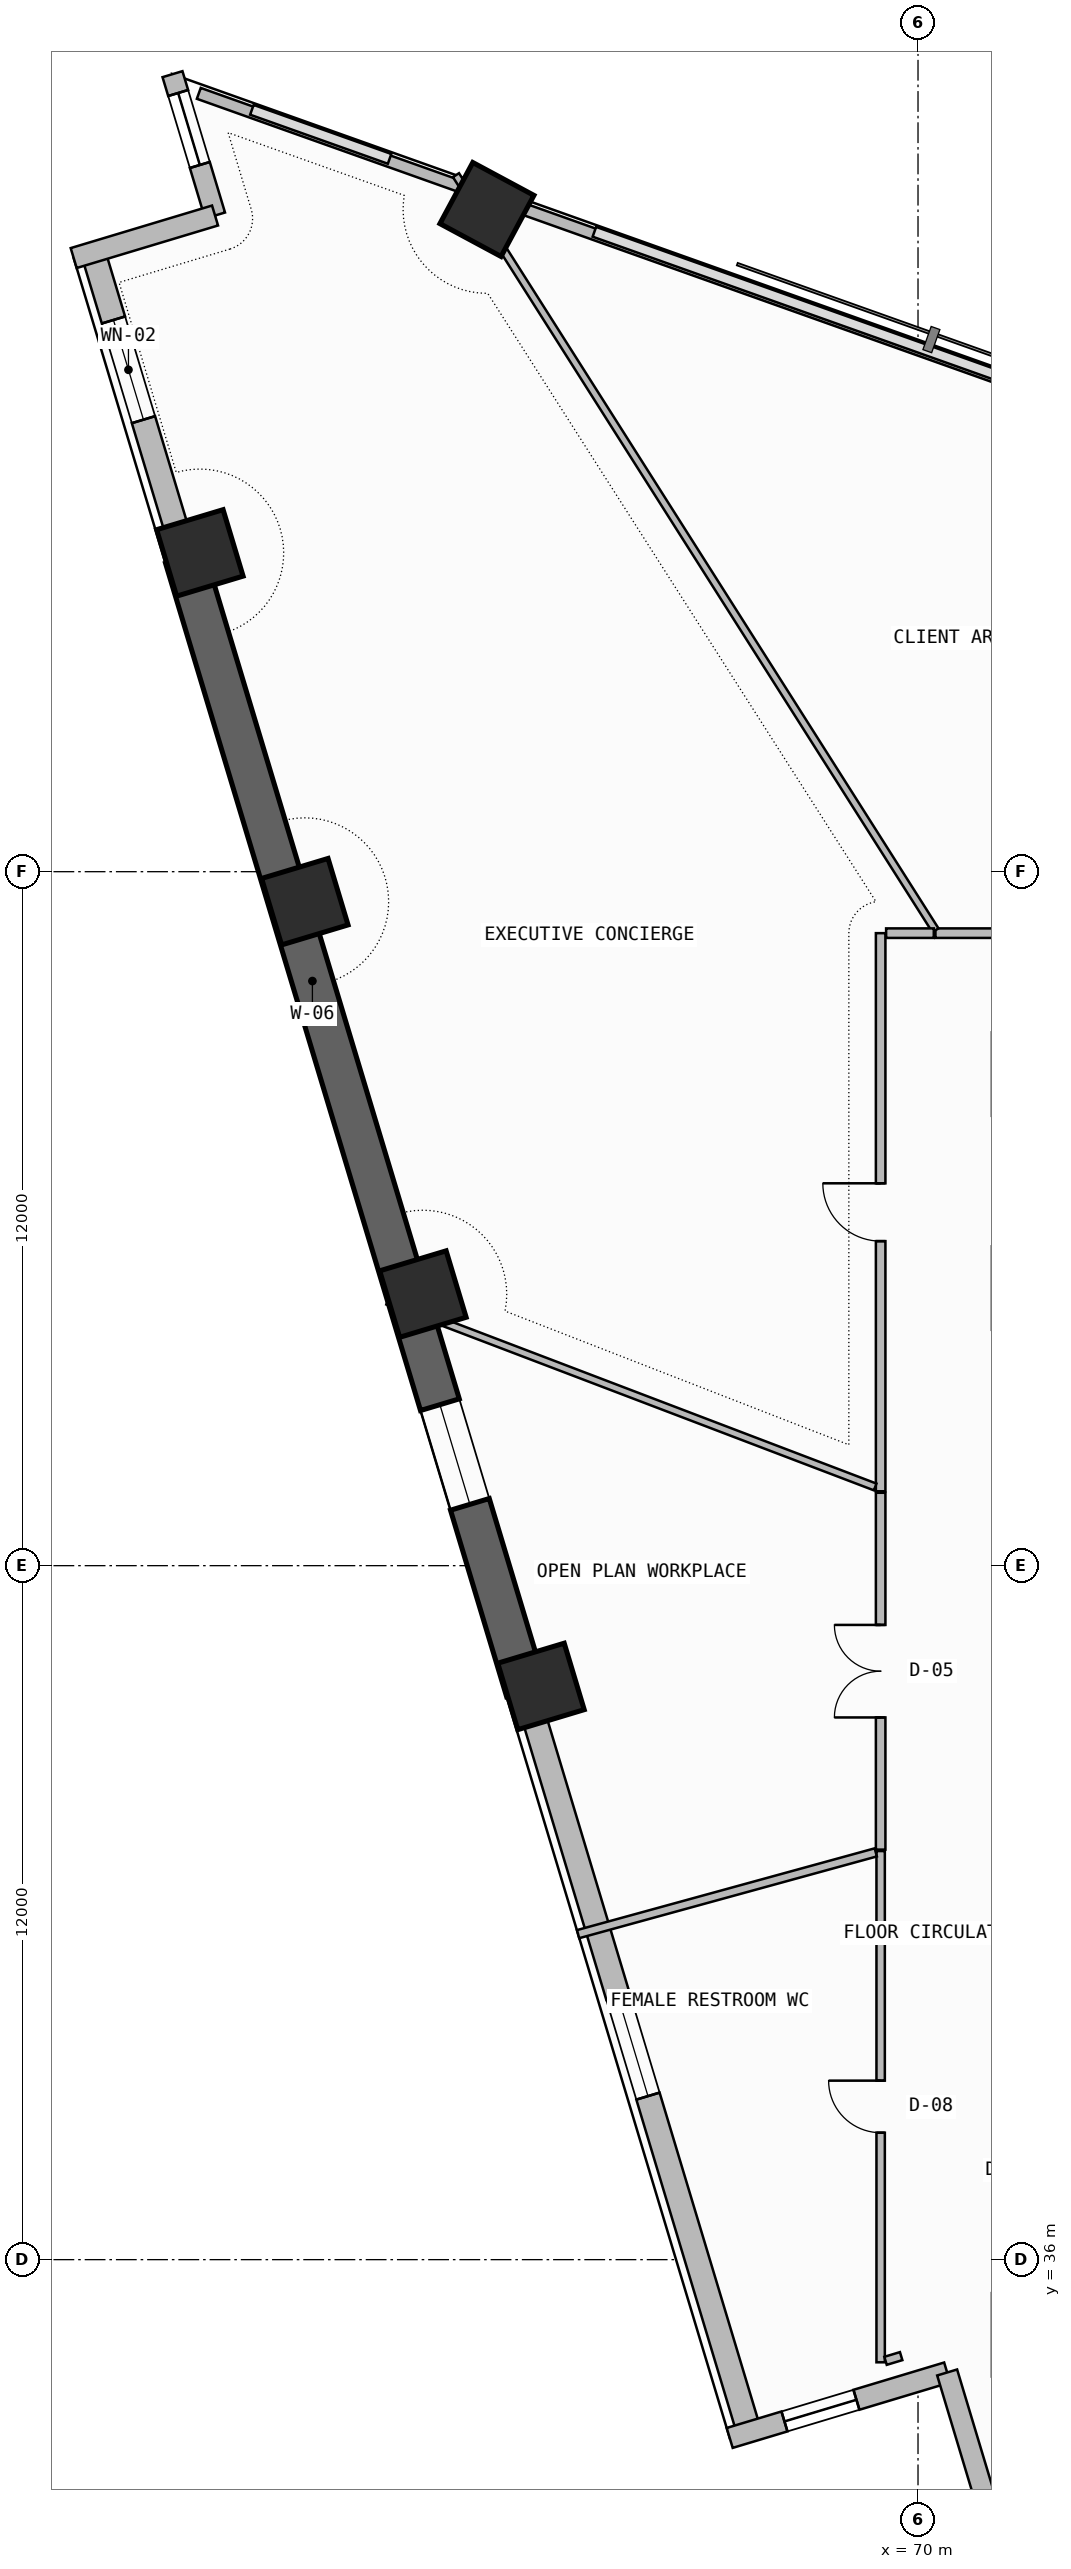
"""IFC4 building model, lengths in metres.
Left out: names, types, materials, properties, quantities, classifications, styles, units other than length and angle.
Written with IfcOpenShell. Run it as: python <this file> out.ifc"""

import sys

from ifc_helpers import new_model, si_unit, direction, frame, frame_2d, origin, origin_2d, place, context, subcontext, project, spatial, rectangle, extrude, element, fill, save


model = new_model("IFC4")
c1 = context("Model", 3, precision=1e-05, world=origin(), true_north=direction((0.0, 1.0)))
c2 = subcontext(c1, "Body", "Model", "MODEL_VIEW")
j1 = project(units=[si_unit("LENGTHUNIT", "METRE"), si_unit("PLANEANGLEUNIT", "RADIAN")], contexts=[c1])
p1 = place(None, origin())
s1 = spatial("IfcSite", under=j1, at=p1, CompositionType="ELEMENT")
p2 = place(p1, origin())
s2 = spatial("IfcBuilding", under=s1, at=p2, CompositionType="ELEMENT")
p3 = place(p2, frame((0.0, 0.0, 153.9)))
s3 = spatial("IfcBuildingStorey", under=s2, at=p3, CompositionType="ELEMENT", Elevation=153.9)
for number, where, z_axis, x_axis in (
    (1, (62.545, 71.45, 0.0), (0.0, 0.0, 1.0), (0.473, 0.881, 0.0)),
    (2, (57.581, 65.512, 0.0), (0.0, 0.0, 1.0), (-0.288, 0.958, 0.0)),
    (3, (59.396, 59.481, 0.0), (0.0, 0.0, 1.0), (-0.288, 0.958, 0.0)),
    (4, (61.438, 52.696, 0.0), (0.0, 0.0, 1.0), (-0.288, 0.958, 0.0)),
    (5, (63.48, 45.912, 0.0), (0.0, 0.0, 1.0), (-0.288, 0.958, 0.0)),
):
    element("IfcColumn", number, at=place(p3, frame(where, z_axis=z_axis, x_axis=x_axis)), inside=s3, PredefinedType="COLUMN", context=c2, shape_type="SweptSolid", body=[
        extrude(rectangle(XDim=1.2, YDim=1.2, at=origin_2d()), origin(), (0.0, 0.0, 1.0), 3.6),
    ])
p4 = place(p3, frame((55.734, 70.711, 0.0), z_axis=(0.0, 0.0, 1.0), x_axis=(0.288221590884, -0.957563739157, 0.0)))
e6 = element("IfcWall", 6, at=p4, inside=s3, PredefinedType="SOLIDWALL", context=c2, shape_type="SweptSolid", body=[
    extrude(rectangle(XDim=5.511, YDim=0.42, at=frame_2d((2.755, 0.0))), origin(), (0.0, 0.0, 1.0), 2.725),
])
p5 = place(p4, frame((1.223, 0.0, 1.2)))
e7 = element("IfcOpeningElement", 7, at=p5, cuts=e6, PredefinedType="OPENING", context=c2, shape_type="SweptSolid", body=[
    extrude(rectangle(XDim=1.8, YDim=0.9, at=frame_2d((0.9, 0.45))), frame((0.0, 0.22, 0.0), z_axis=(0.0, -1.0, 0.0), x_axis=(1.0, 0.0, 0.0)), (0.0, 0.0, 1.0), 0.44),
])
p6 = place(p3, frame((57.323, 65.434, -0.26), z_axis=(0.0, 0.0, 1.0), x_axis=(0.288188159352, -0.957573801234, 0.0)))
e8 = element("IfcWall", 8, at=p6, inside=s3, PredefinedType="SHEAR", context=c2, shape_type="SweptSolid", body=[
    extrude(rectangle(XDim=20.469, YDim=0.7, at=frame_2d((10.234, 0.0))), origin(), (0.0, 0.0, 1.0), 3.6),
])
p7 = place(p6, frame((15.3, 0.0, 1.2)))
e9 = element("IfcOpeningElement", 9, at=p7, cuts=e8, PredefinedType="OPENING", context=c2, shape_type="SweptSolid", body=[
    extrude(rectangle(XDim=1.8, YDim=0.9, at=frame_2d((0.9, 0.45))), frame((0.0, 0.36, 0.0), z_axis=(0.0, -1.0, 0.0), x_axis=(1.0, 0.0, 0.0)), (0.0, 0.0, 1.0), 0.72),
])
p8 = place(p3, frame((63.221, 45.834, 0.0), z_axis=(0.0, 0.0, 1.0), x_axis=(0.288202962273, -0.957569346072, 0.0)))
e10 = element("IfcWall", 10, at=p8, inside=s3, PredefinedType="SOLIDWALL", context=c2, shape_type="SweptSolid", body=[
    extrude(rectangle(XDim=13.384, YDim=0.42, at=frame_2d((6.692, 0.0))), origin(), (0.0, 0.0, 1.0), 2.725),
])
p9 = place(p8, frame((5.517, 0.0, 1.2)))
e11 = element("IfcOpeningElement", 11, at=p9, cuts=e10, PredefinedType="OPENING", context=c2, shape_type="SweptSolid", body=[
    extrude(rectangle(XDim=1.8, YDim=0.9, at=frame_2d((0.9, 0.45))), frame((0.0, 0.22, 0.0), z_axis=(0.0, -1.0, 0.0), x_axis=(1.0, 0.0, 0.0)), (0.0, 0.0, 1.0), 0.44),
])
p10 = place(p3, frame((57.108, 73.79, 0.0), z_axis=(0.0, 0.0, 1.0), x_axis=(0.288198985694, -0.957570542908, 0.0)))
e12 = element("IfcWall", 12, at=p10, inside=s3, PredefinedType="SOLIDWALL", context=c2, shape_type="SweptSolid", body=[
    extrude(rectangle(XDim=2.552, YDim=0.36, at=frame_2d((1.276, 0.0))), origin(), (0.0, 0.0, 1.0), 3.34),
])
p11 = place(p10, frame((0.34, 0.0, 0.45)))
e13 = element("IfcOpeningElement", 13, at=p11, cuts=e12, PredefinedType="OPENING", context=c2, shape_type="SweptSolid", body=[
    extrude(rectangle(XDim=1.3, YDim=2.4, at=frame_2d((0.65, 1.2))), frame((0.0, 0.19, 0.0), z_axis=(0.0, -1.0, 0.0), x_axis=(1.0, 0.0, 0.0)), (0.0, 0.0, 1.0), 0.38),
])
p12 = place(p3, frame((57.843, 71.346, 0.0), z_axis=(0.0, 0.0, 1.0), x_axis=(-0.95757848653, -0.288172590882, 0.0)))
e14 = element("IfcWall", 14, at=p12, inside=s3, PredefinedType="SOLIDWALL", context=c2, shape_type="SweptSolid", body=[
    extrude(rectangle(XDim=2.553, YDim=0.36, at=frame_2d((1.276, 0.0))), origin(), (0.0, 0.0, 1.0), 3.34),
])
p13 = place(p3, frame((66.743, 32.917, 0.0), z_axis=(0.0, 0.0, 1.0), x_axis=(0.957584687378, 0.288151985068, 0.0)))
e15 = element("IfcWall", 15, at=p13, inside=s3, PredefinedType="SOLIDWALL", context=c2, shape_type="SweptSolid", body=[
    extrude(rectangle(XDim=3.927, YDim=0.36, at=frame_2d((1.963, 0.0))), origin(), (0.0, 0.0, 1.0), 3.34),
])
p14 = place(p13, frame((0.989, 0.0, 0.45)))
e16 = element("IfcOpeningElement", 16, at=p14, cuts=e15, PredefinedType="OPENING", context=c2, shape_type="SweptSolid", body=[
    extrude(rectangle(XDim=1.3, YDim=2.4, at=frame_2d((0.65, 1.2))), frame((0.0, 0.19, 0.0), z_axis=(0.0, -1.0, 0.0), x_axis=(1.0, 0.0, 0.0)), (0.0, 0.0, 1.0), 0.38),
])
p15 = place(p3, frame((70.504, 34.049, 0.0), z_axis=(0.0, 0.0, 1.0), x_axis=(0.288169140251, -0.957579524952, 0.0)))
e17 = element("IfcWall", 17, at=p15, inside=s3, PredefinedType="SOLIDWALL", context=c2, shape_type="SweptSolid", body=[
    extrude(rectangle(XDim=3.927, YDim=0.36, at=frame_2d((1.963, 0.0))), origin(), (0.0, 0.0, 1.0), 3.34),
])
p16 = place(p3, frame((89.368, 62.13, 0.0), z_axis=(0.0, 0.0, 1.0), x_axis=(-0.942033439765, 0.335518998515, 0.0)))
e18 = element("IfcWall", 18, at=p16, inside=s3, PredefinedType="PARAPET", context=c2, shape_type="SweptSolid", body=[
    extrude(rectangle(XDim=27.969, YDim=0.2, at=frame_2d((13.985, 0.0))), origin(), (0.0, 0.0, 1.0), 1.15),
])
p17 = place(p3, frame((62.218, 71.801, 0.0), z_axis=(0.0, 0.0, 1.0), x_axis=(-0.942038862895, 0.335503771655, 0.0)))
e19 = element("IfcWall", 19, at=p17, inside=s3, PredefinedType="PARAPET", context=c2, shape_type="SweptSolid", body=[
    extrude(rectangle(XDim=4.942, YDim=0.2, at=frame_2d((2.471, 0.0))), origin(), (0.0, 0.0, 1.0), 1.15),
])
p18 = place(p3, frame((69.354, 43.065, 0.0), z_axis=(0.0, 0.0, 1.0), x_axis=(0.0, -1.0, 0.0)))
e20 = element("IfcWall", 20, at=p18, inside=s3, PredefinedType="PARTITIONING", context=c2, shape_type="SweptSolid", body=[
    extrude(rectangle(XDim=8.84, YDim=0.145, at=frame_2d((4.42, 0.0))), origin(), (0.0, 0.0, 1.0), 3.34),
])
p19 = place(p18, frame((3.97, 0.0, 0.0)))
e21 = element("IfcOpeningElement", 21, at=p19, cuts=e20, PredefinedType="OPENING", context=c2, shape_type="SweptSolid", body=[
    extrude(rectangle(XDim=0.9, YDim=2.1, at=frame_2d((0.45, 1.05))), frame((0.0, 0.083, 0.0), z_axis=(0.0, -1.0, 0.0), x_axis=(1.0, 0.0, 0.0)), (0.0, 0.0, 1.0), 0.165),
])
p20 = place(p3, frame((69.438, 34.25, 0.0), z_axis=(0.0, 0.0, 1.0), x_axis=(0.957611740153, 0.288062068176, 0.0)))
e22 = element("IfcWall", 22, at=p20, inside=s3, PredefinedType="PARTITIONING", context=c2, shape_type="SweptSolid", body=[
    extrude(rectangle(XDim=0.282, YDim=0.145, at=frame_2d((0.141, 0.0))), origin(), (0.0, 0.0, 1.0), 3.34),
])
p21 = place(p3, frame((64.122, 41.628, 0.0), z_axis=(0.0, 0.0, 1.0), x_axis=(0.964303252741, 0.264800371514, 0.0)))
e23 = element("IfcWall", 23, at=p21, inside=s3, PredefinedType="PARTITIONING", context=c2, shape_type="SweptSolid", body=[
    extrude(rectangle(XDim=5.338, YDim=0.145, at=frame_2d((2.669, 0.0))), origin(), (0.0, 0.0, 1.0), 3.34),
])
p22 = place(p3, frame((79.639, 58.937, 0.0), z_axis=(0.0, 0.0, 1.0), x_axis=(-1.0, 0.0, 0.0)))
e24 = element("IfcWall", 24, at=p22, inside=s3, PredefinedType="PARTITIONING", context=c2, shape_type="SweptSolid", body=[
    extrude(rectangle(XDim=9.338, YDim=0.165, at=frame_2d((4.669, 0.0))), origin(), (0.0, 0.0, 1.0), 2.725),
])
p23 = place(p22, frame((4.169, 0.0, 0.0)))
e25 = element("IfcOpeningElement", 25, at=p23, cuts=e24, PredefinedType="OPENING", context=c2, shape_type="SweptSolid", body=[
    extrude(rectangle(XDim=1.0, YDim=2.2, at=frame_2d((0.5, 1.1))), frame((0.0, 0.093, 0.0), z_axis=(0.0, -1.0, 0.0), x_axis=(1.0, 0.0, 0.0)), (0.0, 0.0, 1.0), 0.185),
])
p24 = place(p3, frame((70.301, 58.987, 0.0), z_axis=(0.0, 0.0, 1.0), x_axis=(-0.536044918422, 0.844189460627, 0.0)))
e26 = element("IfcWall", 26, at=p24, inside=s3, PredefinedType="PARTITIONING", context=c2, shape_type="SweptSolid", body=[
    extrude(rectangle(XDim=15.468, YDim=0.125, at=frame_2d((7.734, 0.0))), origin(), (0.0, 0.0, 1.0), 2.725),
])
p25 = place(p3, frame((69.354, 58.937, 0.0), z_axis=(0.0, 0.0, 1.0), x_axis=(0.0, -1.0, 0.0)))
e27 = element("IfcWall", 27, at=p25, inside=s3, PredefinedType="PARTITIONING", context=c2, shape_type="SweptSolid", body=[
    extrude(rectangle(XDim=9.651, YDim=0.165, at=frame_2d((4.825, 0.0))), origin(), (0.0, 0.0, 1.0), 2.725),
])
p26 = place(p25, frame((4.325, 0.0, 0.0)))
e28 = element("IfcOpeningElement", 28, at=p26, cuts=e27, PredefinedType="OPENING", context=c2, shape_type="SweptSolid", body=[
    extrude(rectangle(XDim=1.0, YDim=2.2, at=frame_2d((0.5, 1.1))), frame((0.0, 0.093, 0.0), z_axis=(0.0, -1.0, 0.0), x_axis=(1.0, 0.0, 0.0)), (0.0, 0.0, 1.0), 0.185),
])
p27 = place(p3, frame((70.273, 58.937, 0.0), z_axis=(0.0, 0.0, 1.0), x_axis=(-1.0, 0.0, 0.0)))
e29 = element("IfcWall", 29, at=p27, inside=s3, PredefinedType="PARTITIONING", context=c2, shape_type="SweptSolid", body=[
    extrude(rectangle(XDim=0.824, YDim=0.165, at=frame_2d((0.412, 0.0))), origin(), (0.0, 0.0, 1.0), 2.725),
])
p28 = place(p3, frame((69.259, 49.361, 0.0), z_axis=(0.0, 0.0, 1.0), x_axis=(-0.934442294221, 0.356114586575, 0.0)))
e30 = element("IfcWall", 30, at=p28, inside=s3, PredefinedType="PARTITIONING", context=c2, shape_type="SweptSolid", body=[
    extrude(rectangle(XDim=9.023, YDim=0.125, at=frame_2d((4.512, 0.0))), origin(), (0.0, 0.0, 1.0), 2.725),
])
p29 = place(p3, frame((69.354, 49.26, 0.0), z_axis=(0.0, 0.0, 1.0), x_axis=(0.0, -1.0, 0.0)))
e31 = element("IfcWall", 31, at=p29, inside=s3, PredefinedType="PARTITIONING", context=c2, shape_type="SweptSolid", body=[
    extrude(rectangle(XDim=6.17, YDim=0.165, at=frame_2d((3.085, 0.0))), origin(), (0.0, 0.0, 1.0), 3.34),
])
p30 = place(p29, frame((2.285, 0.0, 0.0)))
e32 = element("IfcOpeningElement", 32, at=p30, cuts=e31, PredefinedType="OPENING", context=c2, shape_type="SweptSolid", body=[
    extrude(rectangle(XDim=1.6, YDim=2.3, at=frame_2d((0.8, 1.15))), frame((0.0, 0.093, 0.0), z_axis=(0.0, -1.0, 0.0), x_axis=(1.0, 0.0, 0.0)), (0.0, 0.0, 1.0), 0.185),
])
p31 = place(p5, origin())
e33 = element("IfcWindow", 33, at=p31, inside=s3, PartitioningType="SINGLE_PANEL", PredefinedType="WINDOW", context=c2, shape_type="SweptSolid", body=[
    extrude(rectangle(XDim=1.8, YDim=0.9, at=frame_2d((0.9, 0.45))), frame((0.0, 0.03, 0.0), z_axis=(0.0, -1.0, 0.0), x_axis=(1.0, 0.0, 0.0)), (0.0, 0.0, 1.0), 0.06),
])
fill(e7, e33)
p32 = place(p7, origin())
e34 = element("IfcWindow", 34, at=p32, inside=s3, PartitioningType="SINGLE_PANEL", PredefinedType="WINDOW", context=c2, shape_type="SweptSolid", body=[
    extrude(rectangle(XDim=1.8, YDim=0.9, at=frame_2d((0.9, 0.45))), frame((0.0, 0.03, 0.0), z_axis=(0.0, -1.0, 0.0), x_axis=(1.0, 0.0, 0.0)), (0.0, 0.0, 1.0), 0.06),
])
fill(e9, e34)
p33 = place(p9, origin())
e35 = element("IfcWindow", 35, at=p33, inside=s3, PartitioningType="SINGLE_PANEL", PredefinedType="WINDOW", context=c2, shape_type="SweptSolid", body=[
    extrude(rectangle(XDim=1.8, YDim=0.9, at=frame_2d((0.9, 0.45))), frame((0.0, 0.03, 0.0), z_axis=(0.0, -1.0, 0.0), x_axis=(1.0, 0.0, 0.0)), (0.0, 0.0, 1.0), 0.06),
])
fill(e11, e35)
p34 = place(p11, origin())
e36 = element("IfcWindow", 36, at=p34, inside=s3, PartitioningType="SINGLE_PANEL", PredefinedType="WINDOW", context=c2, shape_type="SweptSolid", body=[
    extrude(rectangle(XDim=1.3, YDim=2.4, at=frame_2d((0.65, 1.2))), frame((0.0, 0.03, 0.0), z_axis=(0.0, -1.0, 0.0), x_axis=(1.0, 0.0, 0.0)), (0.0, 0.0, 1.0), 0.06),
])
fill(e13, e36)
p35 = place(p14, origin())
e37 = element("IfcWindow", 37, at=p35, inside=s3, PartitioningType="SINGLE_PANEL", PredefinedType="WINDOW", context=c2, shape_type="SweptSolid", body=[
    extrude(rectangle(XDim=1.3, YDim=2.4, at=frame_2d((0.65, 1.2))), frame((0.0, 0.03, 0.0), z_axis=(0.0, -1.0, 0.0), x_axis=(1.0, 0.0, 0.0)), (0.0, 0.0, 1.0), 0.06),
])
fill(e16, e37)
p36 = place(p19, frame((0.9, 0.0, 0.0), z_axis=(0.0, 0.0, 1.0), x_axis=(-1.0, 0.0, 0.0)))
e38 = element("IfcDoor", 38, at=p36, inside=s3, OperationType="SINGLE_SWING_RIGHT", PredefinedType="DOOR", context=c2, shape_type="SweptSolid", body=[
    extrude(rectangle(XDim=0.9, YDim=2.1, at=frame_2d((0.45, 1.05))), frame((0.0, 0.025, 0.0), z_axis=(0.0, -1.0, 0.0), x_axis=(1.0, 0.0, 0.0)), (0.0, 0.0, 1.0), 0.05),
])
fill(e21, e38)
p37 = place(p26, frame((1.0, 0.0, 0.0), z_axis=(0.0, 0.0, 1.0), x_axis=(-1.0, 0.0, 0.0)))
e39 = element("IfcDoor", 39, at=p37, inside=s3, OperationType="SINGLE_SWING_RIGHT", PredefinedType="DOOR", context=c2, shape_type="SweptSolid", body=[
    extrude(rectangle(XDim=1.0, YDim=2.2, at=frame_2d((0.5, 1.1))), frame((0.0, 0.025, 0.0), z_axis=(0.0, -1.0, 0.0), x_axis=(1.0, 0.0, 0.0)), (0.0, 0.0, 1.0), 0.05),
])
fill(e28, e39)
p38 = place(p30, frame((1.6, 0.0, 0.0), z_axis=(0.0, 0.0, 1.0), x_axis=(-1.0, 0.0, 0.0)))
e40 = element("IfcDoor", 40, at=p38, inside=s3, OperationType="DOUBLE_DOOR_SINGLE_SWING", PredefinedType="DOOR", context=c2, shape_type="SweptSolid", body=[
    extrude(rectangle(XDim=1.6, YDim=2.3, at=frame_2d((0.8, 1.15))), frame((0.0, 0.025, 0.0), z_axis=(0.0, -1.0, 0.0), x_axis=(1.0, 0.0, 0.0)), (0.0, 0.0, 1.0), 0.05),
])
fill(e32, e40)
save(model, sys.argv[1])
